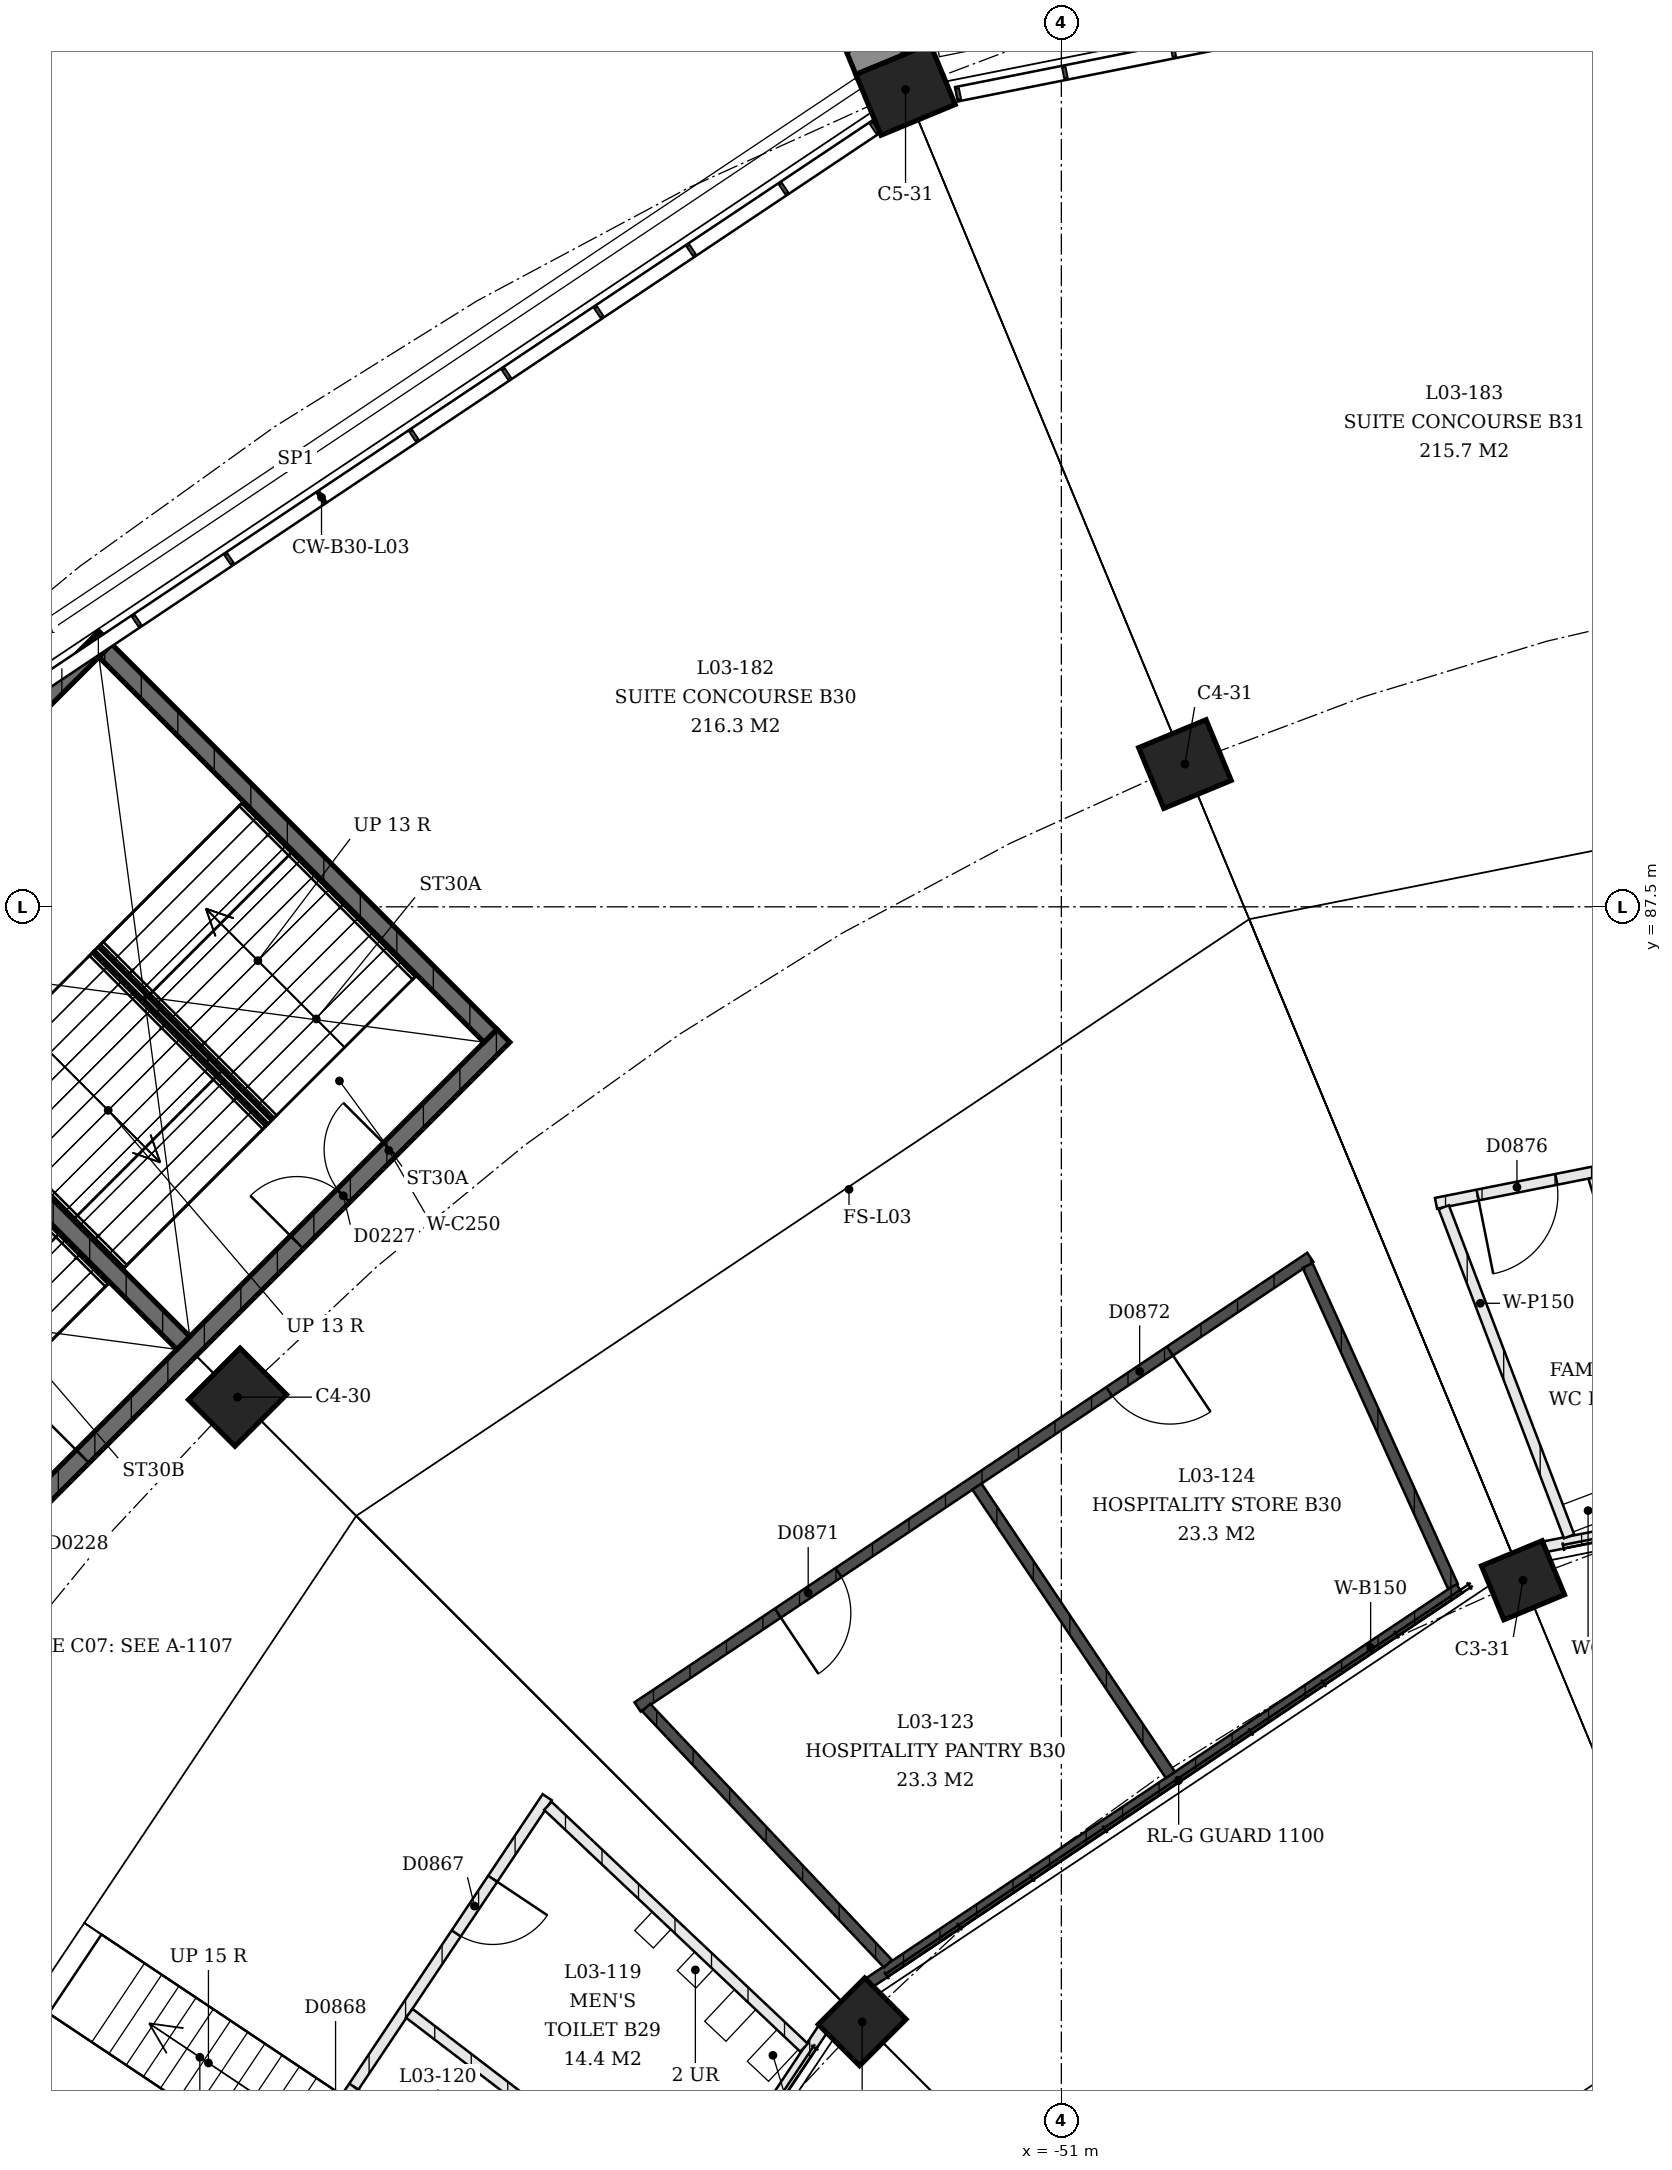
"""IFC4 building model, lengths in metres.
Left out: names, types, materials, properties, quantities, classifications, styles, units other than length and angle.
Written with IfcOpenShell. Run it as: python <this file> out.ifc"""

import sys

from ifc_helpers import new_model, si_unit, direction, frame, frame_2d, origin, origin_2d, place, context, subcontext, project, spatial, rectangle, extrude, element, fill, save


model = new_model("IFC4")
c1 = context("Model", 3, precision=1e-05, world=origin(), true_north=direction((0.0, 1.0)))
c2 = subcontext(c1, "Body", "Model", "MODEL_VIEW")
j1 = project(units=[si_unit("LENGTHUNIT", "METRE"), si_unit("PLANEANGLEUNIT", "RADIAN")], contexts=[c1])
p1 = place(None, origin())
s1 = spatial("IfcSite", under=j1, at=p1, CompositionType="ELEMENT")
p2 = place(p1, origin())
s2 = spatial("IfcBuilding", under=s1, at=p2, CompositionType="ELEMENT")
p3 = place(p2, frame((0.0, 0.0, 13.5)))
s3 = spatial("IfcBuildingStorey", under=s2, at=p3, CompositionType="ELEMENT", Elevation=13.5)
p4 = place(p3, frame((-53.728, 72.228, 0.0), z_axis=(0.0, 0.0, 1.0), x_axis=(-0.707106781187, -0.707106781187, 0.0)))
e1 = element("IfcColumn", 1, at=p4, inside=s3, PredefinedType="COLUMN", context=c2, shape_type="SweptSolid", body=[
    extrude(rectangle(XDim=0.9, YDim=0.8, at=origin_2d()), origin(), (0.0, 0.0, 1.0), 2.033),
])
p5 = place(p3, frame((-62.284, 80.784, 0.0), z_axis=(0.0, 0.0, 1.0), x_axis=(-0.707106781187, -0.707106781187, 0.0)))
e2 = element("IfcColumn", 2, at=p5, inside=s3, PredefinedType="COLUMN", context=c2, shape_type="SweptSolid", body=[
    extrude(rectangle(XDim=1.0, YDim=0.9, at=origin_2d()), origin(), (0.0, 0.0, 1.0), 4.5),
])
p6 = place(p3, frame((-44.677, 78.276, 0.0), z_axis=(0.0, 0.0, 1.0), x_axis=(-0.923879532511, -0.382683432365, 0.0)))
e3 = element("IfcColumn", 3, at=p6, inside=s3, PredefinedType="COLUMN", context=c2, shape_type="SweptSolid", body=[
    extrude(rectangle(XDim=0.9, YDim=0.8, at=origin_2d()), origin(), (0.0, 0.0, 1.0), 2.033),
])
p7 = place(p3, frame((-49.307, 89.455, 0.0), z_axis=(0.0, 0.0, 1.0), x_axis=(-0.923879532511, -0.382683432365, 0.0)))
e4 = element("IfcColumn", 4, at=p7, inside=s3, PredefinedType="COLUMN", context=c2, shape_type="SweptSolid", body=[
    extrude(rectangle(XDim=1.0, YDim=0.9, at=origin_2d()), origin(), (0.0, 0.0, 1.0), 4.5),
])
p8 = place(p3, frame((-53.134, 98.694, 0.0), z_axis=(0.0, 0.0, 1.0), x_axis=(-0.923879532511, -0.382683432365, 0.0)))
e5 = element("IfcColumn", 5, at=p8, inside=s3, PredefinedType="COLUMN", context=c2, shape_type="SweptSolid", body=[
    extrude(rectangle(XDim=1.1, YDim=0.9, at=origin_2d()), origin(), (0.0, 0.0, 1.0), 4.5),
])
p9 = place(p3, frame((-58.643, 85.734, 0.0), z_axis=(0.0, 0.0, 1.0), x_axis=(-0.707106781187, -0.707106781187, 0.0)))
e6 = element("IfcWall", 6, at=p9, inside=s3, PredefinedType="SHEAR", context=c2, shape_type="SweptSolid", body=[
    extrude(rectangle(XDim=12.15, YDim=0.25, at=frame_2d((6.075, 0.0))), origin(), (0.0, 0.0, 1.0), 4.09),
])
p10 = place(p9, frame((2.2, 0.0, 0.0)))
e7 = element("IfcOpeningElement", 7, at=p10, cuts=e6, PredefinedType="OPENING", context=c2, shape_type="SweptSolid", body=[
    extrude(rectangle(XDim=1.8, YDim=2.1, at=frame_2d((0.9, 1.05))), frame((0.0, 0.125, 0.0), z_axis=(0.0, -1.0, 0.0), x_axis=(1.0, 0.0, 0.0)), (0.0, 0.0, 1.0), 0.25),
])
p11 = place(p9, frame((8.15, 0.0, 0.0)))
e8 = element("IfcOpeningElement", 8, at=p11, cuts=e6, PredefinedType="OPENING", context=c2, shape_type="SweptSolid", body=[
    extrude(rectangle(XDim=1.8, YDim=2.1, at=frame_2d((0.9, 1.05))), frame((0.0, 0.125, 0.0), z_axis=(0.0, -1.0, 0.0), x_axis=(1.0, 0.0, 0.0)), (0.0, 0.0, 1.0), 0.25),
])
p12 = place(p3, frame((-64.094, 91.186, 0.0), z_axis=(0.0, 0.0, 1.0), x_axis=(-0.707106781187, -0.707106781187, 0.0)))
e9 = element("IfcWall", 9, at=p12, inside=s3, PredefinedType="SHEAR", context=c2, shape_type="SweptSolid", body=[
    extrude(rectangle(XDim=12.15, YDim=0.25, at=frame_2d((6.075, 0.0))), origin(), (0.0, 0.0, 1.0), 4.09),
])
p13 = place(p3, frame((-58.819, 85.734, 0.0), z_axis=(0.0, 0.0, 1.0), x_axis=(-0.707123144286, 0.707090417709, 0.0)))
e10 = element("IfcWall", 10, at=p13, inside=s3, PredefinedType="SHEAR", context=c2, shape_type="SweptSolid", body=[
    extrude(rectangle(XDim=7.46, YDim=0.25, at=frame_2d((3.73, 0.0))), origin(), (0.0, 0.0, 1.0), 4.09),
])
p14 = place(p3, frame((-63.027, 81.527, 0.0), z_axis=(0.0, 0.0, 1.0), x_axis=(-0.707106781187, 0.707106781187, 0.0)))
e11 = element("IfcWall", 11, at=p14, inside=s3, PredefinedType="SHEAR", context=c2, shape_type="SweptSolid", body=[
    extrude(rectangle(XDim=7.46, YDim=0.25, at=frame_2d((3.73, 0.0))), origin(), (0.0, 0.0, 1.0), 4.09),
])
p15 = place(p3, frame((-54.266, 72.13, 0.0), z_axis=(0.0, 0.0, 1.0), x_axis=(-0.555562437394, -0.83147482112, 0.0)))
e12 = element("IfcWall", 12, at=p15, inside=s3, PredefinedType="PARTITIONING", context=c2, shape_type="SweptSolid", body=[
    extrude(rectangle(XDim=10.125, YDim=0.15, at=frame_2d((5.062, 0.0))), origin(), (0.0, 0.0, 1.0), 3.0),
])
p16 = place(p3, frame((-58.042, 75.305, 0.0), z_axis=(0.0, 0.0, 1.0), x_axis=(-0.555569460176, -0.8314701287, 0.0)))
e13 = element("IfcWall", 13, at=p16, inside=s3, PredefinedType="PARTITIONING", context=c2, shape_type="SweptSolid", body=[
    extrude(rectangle(XDim=11.209, YDim=0.15, at=frame_2d((5.604, 0.0))), origin(), (0.0, 0.0, 1.0), 3.0),
])
p17 = place(p16, frame((1.343, 0.0, 0.0)))
e14 = element("IfcOpeningElement", 14, at=p17, cuts=e13, PredefinedType="OPENING", context=c2, shape_type="SweptSolid", body=[
    extrude(rectangle(XDim=0.9, YDim=2.1, at=frame_2d((0.45, 1.05))), frame((0.0, 0.075, 0.0), z_axis=(0.0, -1.0, 0.0), x_axis=(1.0, 0.0, 0.0)), (0.0, 0.0, 1.0), 0.15),
])
p18 = place(p16, frame((4.768, 0.0, 0.0)))
e15 = element("IfcOpeningElement", 15, at=p18, cuts=e13, PredefinedType="OPENING", context=c2, shape_type="SweptSolid", body=[
    extrude(rectangle(XDim=0.9, YDim=2.1, at=frame_2d((0.45, 1.05))), frame((0.0, 0.075, 0.0), z_axis=(0.0, -1.0, 0.0), x_axis=(1.0, 0.0, 0.0)), (0.0, 0.0, 1.0), 0.15),
])
p19 = place(p16, frame((7.43, 0.0, 0.0)))
e16 = element("IfcOpeningElement", 16, at=p19, cuts=e13, PredefinedType="OPENING", context=c2, shape_type="SweptSolid", body=[
    extrude(rectangle(XDim=1.1, YDim=2.1, at=frame_2d((0.55, 1.05))), frame((0.0, 0.075, 0.0), z_axis=(0.0, -1.0, 0.0), x_axis=(1.0, 0.0, 0.0)), (0.0, 0.0, 1.0), 0.15),
])
p20 = place(p16, frame((9.529, 0.0, 0.0)))
e17 = element("IfcOpeningElement", 17, at=p20, cuts=e13, PredefinedType="OPENING", context=c2, shape_type="SweptSolid", body=[
    extrude(rectangle(XDim=1.1, YDim=2.1, at=frame_2d((0.55, 1.05))), frame((0.0, 0.075, 0.0), z_axis=(0.0, -1.0, 0.0), x_axis=(1.0, 0.0, 0.0)), (0.0, 0.0, 1.0), 0.15),
])
p21 = place(p3, frame((-54.525, 71.875, 0.0), z_axis=(0.0, 0.0, 1.0), x_axis=(-0.727182951144, 0.686443701672, 0.0)))
e18 = element("IfcWall", 18, at=p21, inside=s3, PredefinedType="PARTITIONING", context=c2, shape_type="SweptSolid", body=[
    extrude(rectangle(XDim=4.824, YDim=0.15, at=frame_2d((2.412, 0.0))), origin(), (0.0, 0.0, 1.0), 3.0),
])
p22 = place(p3, frame((-56.146, 69.448, 0.0), z_axis=(0.0, 0.0, 1.0), x_axis=(-0.794129534094, 0.607748536057, 0.0)))
e19 = element("IfcWall", 19, at=p22, inside=s3, PredefinedType="PARTITIONING", context=c2, shape_type="SweptSolid", body=[
    extrude(rectangle(XDim=4.767, YDim=0.15, at=frame_2d((2.383, 0.0))), origin(), (0.0, 0.0, 1.0), 3.0),
])
p23 = place(p3, frame((-53.63, 72.766, 0.0), z_axis=(0.0, 0.0, 1.0), x_axis=(0.831481684117, 0.555552165847, 0.0)))
e20 = element("IfcWall", 20, at=p23, inside=s3, PredefinedType="SOLIDWALL", context=c2, shape_type="SweptSolid", body=[
    extrude(rectangle(XDim=9.718, YDim=0.15, at=frame_2d((4.859, 0.0))), origin(), (0.0, 0.0, 1.0), 3.0),
])
p24 = place(p3, frame((-56.805, 76.542, 0.0), z_axis=(0.0, 0.0, 1.0), x_axis=(0.831470287315, 0.555569222791, 0.0)))
e21 = element("IfcWall", 21, at=p24, inside=s3, PredefinedType="SOLIDWALL", context=c2, shape_type="SweptSolid", body=[
    extrude(rectangle(XDim=11.082, YDim=0.15, at=frame_2d((5.541, 0.0))), origin(), (0.0, 0.0, 1.0), 3.0),
])
p25 = place(p24, frame((2.311, 0.0, 0.0)))
e22 = element("IfcOpeningElement", 22, at=p25, cuts=e21, PredefinedType="OPENING", context=c2, shape_type="SweptSolid", body=[
    extrude(rectangle(XDim=1.0, YDim=2.1, at=frame_2d((0.5, 1.05))), frame((0.0, 0.075, 0.0), z_axis=(0.0, -1.0, 0.0), x_axis=(1.0, 0.0, 0.0)), (0.0, 0.0, 1.0), 0.15),
])
p26 = place(p24, frame((7.771, 0.0, 0.0)))
e23 = element("IfcOpeningElement", 23, at=p26, cuts=e21, PredefinedType="OPENING", context=c2, shape_type="SweptSolid", body=[
    extrude(rectangle(XDim=1.0, YDim=2.1, at=frame_2d((0.5, 1.05))), frame((0.0, 0.075, 0.0), z_axis=(0.0, -1.0, 0.0), x_axis=(1.0, 0.0, 0.0)), (0.0, 0.0, 1.0), 0.15),
])
p27 = place(p3, frame((-53.375, 73.025, 0.0), z_axis=(0.0, 0.0, 1.0), x_axis=(-0.686443701672, 0.727182951144, 0.0)))
e24 = element("IfcWall", 24, at=p27, inside=s3, PredefinedType="SOLIDWALL", context=c2, shape_type="SweptSolid", body=[
    extrude(rectangle(XDim=4.824, YDim=0.15, at=frame_2d((2.412, 0.0))), origin(), (0.0, 0.0, 1.0), 3.0),
])
p28 = place(p3, frame((-49.506, 75.61, 0.0), z_axis=(0.0, 0.0, 1.0), x_axis=(-0.557185009832, 0.830388381915, 0.0)))
e25 = element("IfcWall", 25, at=p28, inside=s3, PredefinedType="SOLIDWALL", context=c2, shape_type="SweptSolid", body=[
    extrude(rectangle(XDim=4.757, YDim=0.15, at=frame_2d((2.378, 0.0))), origin(), (0.0, 0.0, 1.0), 3.0),
])
p29 = place(p3, frame((-45.638, 78.195, 0.0), z_axis=(0.0, 0.0, 1.0), x_axis=(-0.412593178732, 0.910915401596, 0.0)))
e26 = element("IfcWall", 26, at=p29, inside=s3, PredefinedType="SOLIDWALL", context=c2, shape_type="SweptSolid", body=[
    extrude(rectangle(XDim=4.821, YDim=0.15, at=frame_2d((2.411, 0.0))), origin(), (0.0, 0.0, 1.0), 3.0),
])
p30 = place(p3, frame((-34.5, 80.7, 0.0), z_axis=(0.0, 0.0, 1.0), x_axis=(-0.980787996346, -0.195076667554, 0.0)))
e27 = element("IfcWall", 27, at=p30, inside=s3, PredefinedType="PARTITIONING", context=c2, shape_type="SweptSolid", body=[
    extrude(rectangle(XDim=10.073, YDim=0.15, at=frame_2d((5.037, 0.0))), origin(), (0.0, 0.0, 1.0), 3.0),
])
p31 = place(p3, frame((-34.875, 85.626, 0.0), z_axis=(0.0, 0.0, 1.0), x_axis=(-0.980786208969, -0.195085653744, 0.0)))
e28 = element("IfcWall", 28, at=p31, inside=s3, PredefinedType="PARTITIONING", context=c2, shape_type="SweptSolid", body=[
    extrude(rectangle(XDim=11.209, YDim=0.15, at=frame_2d((5.604, 0.0))), origin(), (0.0, 0.0, 1.0), 3.0),
])
p32 = place(p31, frame((1.343, 0.0, 0.0)))
e29 = element("IfcOpeningElement", 29, at=p32, cuts=e28, PredefinedType="OPENING", context=c2, shape_type="SweptSolid", body=[
    extrude(rectangle(XDim=0.9, YDim=2.1, at=frame_2d((0.45, 1.05))), frame((0.0, 0.075, 0.0), z_axis=(0.0, -1.0, 0.0), x_axis=(1.0, 0.0, 0.0)), (0.0, 0.0, 1.0), 0.15),
])
p33 = place(p31, frame((4.768, 0.0, 0.0)))
e30 = element("IfcOpeningElement", 30, at=p33, cuts=e28, PredefinedType="OPENING", context=c2, shape_type="SweptSolid", body=[
    extrude(rectangle(XDim=0.9, YDim=2.1, at=frame_2d((0.45, 1.05))), frame((0.0, 0.075, 0.0), z_axis=(0.0, -1.0, 0.0), x_axis=(1.0, 0.0, 0.0)), (0.0, 0.0, 1.0), 0.15),
])
p34 = place(p31, frame((7.43, 0.0, 0.0)))
e31 = element("IfcOpeningElement", 31, at=p34, cuts=e28, PredefinedType="OPENING", context=c2, shape_type="SweptSolid", body=[
    extrude(rectangle(XDim=1.1, YDim=2.1, at=frame_2d((0.55, 1.05))), frame((0.0, 0.075, 0.0), z_axis=(0.0, -1.0, 0.0), x_axis=(1.0, 0.0, 0.0)), (0.0, 0.0, 1.0), 0.15),
])
p35 = place(p31, frame((9.529, 0.0, 0.0)))
e32 = element("IfcOpeningElement", 32, at=p35, cuts=e28, PredefinedType="OPENING", context=c2, shape_type="SweptSolid", body=[
    extrude(rectangle(XDim=1.1, YDim=2.1, at=frame_2d((0.55, 1.05))), frame((0.0, 0.075, 0.0), z_axis=(0.0, -1.0, 0.0), x_axis=(1.0, 0.0, 0.0)), (0.0, 0.0, 1.0), 0.15),
])
p36 = place(p3, frame((-42.291, 79.226, 0.0), z_axis=(0.0, 0.0, 1.0), x_axis=(-0.296312515745, 0.955091039123, 0.0)))
e33 = element("IfcWall", 33, at=p36, inside=s3, PredefinedType="PARTITIONING", context=c2, shape_type="SweptSolid", body=[
    extrude(rectangle(XDim=4.783, YDim=0.15, at=frame_2d((2.392, 0.0))), origin(), (0.0, 0.0, 1.0), 3.0),
])
p37 = place(p3, frame((-44.045, 78.877, 0.0), z_axis=(0.0, 0.0, 1.0), x_axis=(-0.355921670207, 0.934515791561, 0.0)))
e34 = element("IfcWall", 34, at=p37, inside=s3, PredefinedType="PARTITIONING", context=c2, shape_type="SweptSolid", body=[
    extrude(rectangle(XDim=4.824, YDim=0.15, at=frame_2d((2.412, 0.0))), origin(), (0.0, 0.0, 1.0), 3.0),
])
p38 = place(p10, origin())
e35 = element("IfcDoor", 35, at=p38, inside=s3, OperationType="DOUBLE_DOOR_SINGLE_SWING", PredefinedType="DOOR", context=c2, shape_type="SweptSolid", body=[
    extrude(rectangle(XDim=1.8, YDim=2.1, at=frame_2d((0.9, 1.05))), frame((0.0, 0.025, 0.0), z_axis=(0.0, -1.0, 0.0), x_axis=(1.0, 0.0, 0.0)), (0.0, 0.0, 1.0), 0.05),
])
fill(e7, e35)
p39 = place(p11, origin())
e36 = element("IfcDoor", 36, at=p39, inside=s3, OperationType="DOUBLE_DOOR_SINGLE_SWING", PredefinedType="DOOR", context=c2, shape_type="SweptSolid", body=[
    extrude(rectangle(XDim=1.8, YDim=2.1, at=frame_2d((0.9, 1.05))), frame((0.0, 0.025, 0.0), z_axis=(0.0, -1.0, 0.0), x_axis=(1.0, 0.0, 0.0)), (0.0, 0.0, 1.0), 0.05),
])
fill(e8, e36)
p40 = place(p17, origin())
e37 = element("IfcDoor", 37, at=p40, inside=s3, OperationType="SINGLE_SWING_RIGHT", PredefinedType="DOOR", context=c2, shape_type="SweptSolid", body=[
    extrude(rectangle(XDim=0.9, YDim=2.1, at=frame_2d((0.45, 1.05))), frame((0.0, 0.025, 0.0), z_axis=(0.0, -1.0, 0.0), x_axis=(1.0, 0.0, 0.0)), (0.0, 0.0, 1.0), 0.05),
])
fill(e14, e37)
p41 = place(p18, origin())
e38 = element("IfcDoor", 38, at=p41, inside=s3, OperationType="SINGLE_SWING_RIGHT", PredefinedType="DOOR", context=c2, shape_type="SweptSolid", body=[
    extrude(rectangle(XDim=0.9, YDim=2.1, at=frame_2d((0.45, 1.05))), frame((0.0, 0.025, 0.0), z_axis=(0.0, -1.0, 0.0), x_axis=(1.0, 0.0, 0.0)), (0.0, 0.0, 1.0), 0.05),
])
fill(e15, e38)
p42 = place(p25, origin())
e39 = element("IfcDoor", 39, at=p42, inside=s3, OperationType="SINGLE_SWING_LEFT", PredefinedType="DOOR", context=c2, shape_type="SweptSolid", body=[
    extrude(rectangle(XDim=1.0, YDim=2.1, at=frame_2d((0.5, 1.05))), frame((0.0, 0.025, 0.0), z_axis=(0.0, -1.0, 0.0), x_axis=(1.0, 0.0, 0.0)), (0.0, 0.0, 1.0), 0.05),
])
fill(e22, e39)
p43 = place(p26, origin())
e40 = element("IfcDoor", 40, at=p43, inside=s3, OperationType="SINGLE_SWING_RIGHT", PredefinedType="DOOR", context=c2, shape_type="SweptSolid", body=[
    extrude(rectangle(XDim=1.0, YDim=2.1, at=frame_2d((0.5, 1.05))), frame((0.0, 0.025, 0.0), z_axis=(0.0, -1.0, 0.0), x_axis=(1.0, 0.0, 0.0)), (0.0, 0.0, 1.0), 0.05),
])
fill(e23, e40)
p44 = place(p35, origin())
e41 = element("IfcDoor", 41, at=p44, inside=s3, OperationType="SINGLE_SWING_LEFT", PredefinedType="DOOR", context=c2, shape_type="SweptSolid", body=[
    extrude(rectangle(XDim=1.1, YDim=2.1, at=frame_2d((0.55, 1.05))), frame((0.0, 0.025, 0.0), z_axis=(0.0, -1.0, 0.0), x_axis=(1.0, 0.0, 0.0)), (0.0, 0.0, 1.0), 0.05),
])
fill(e32, e41)
save(model, sys.argv[1])
